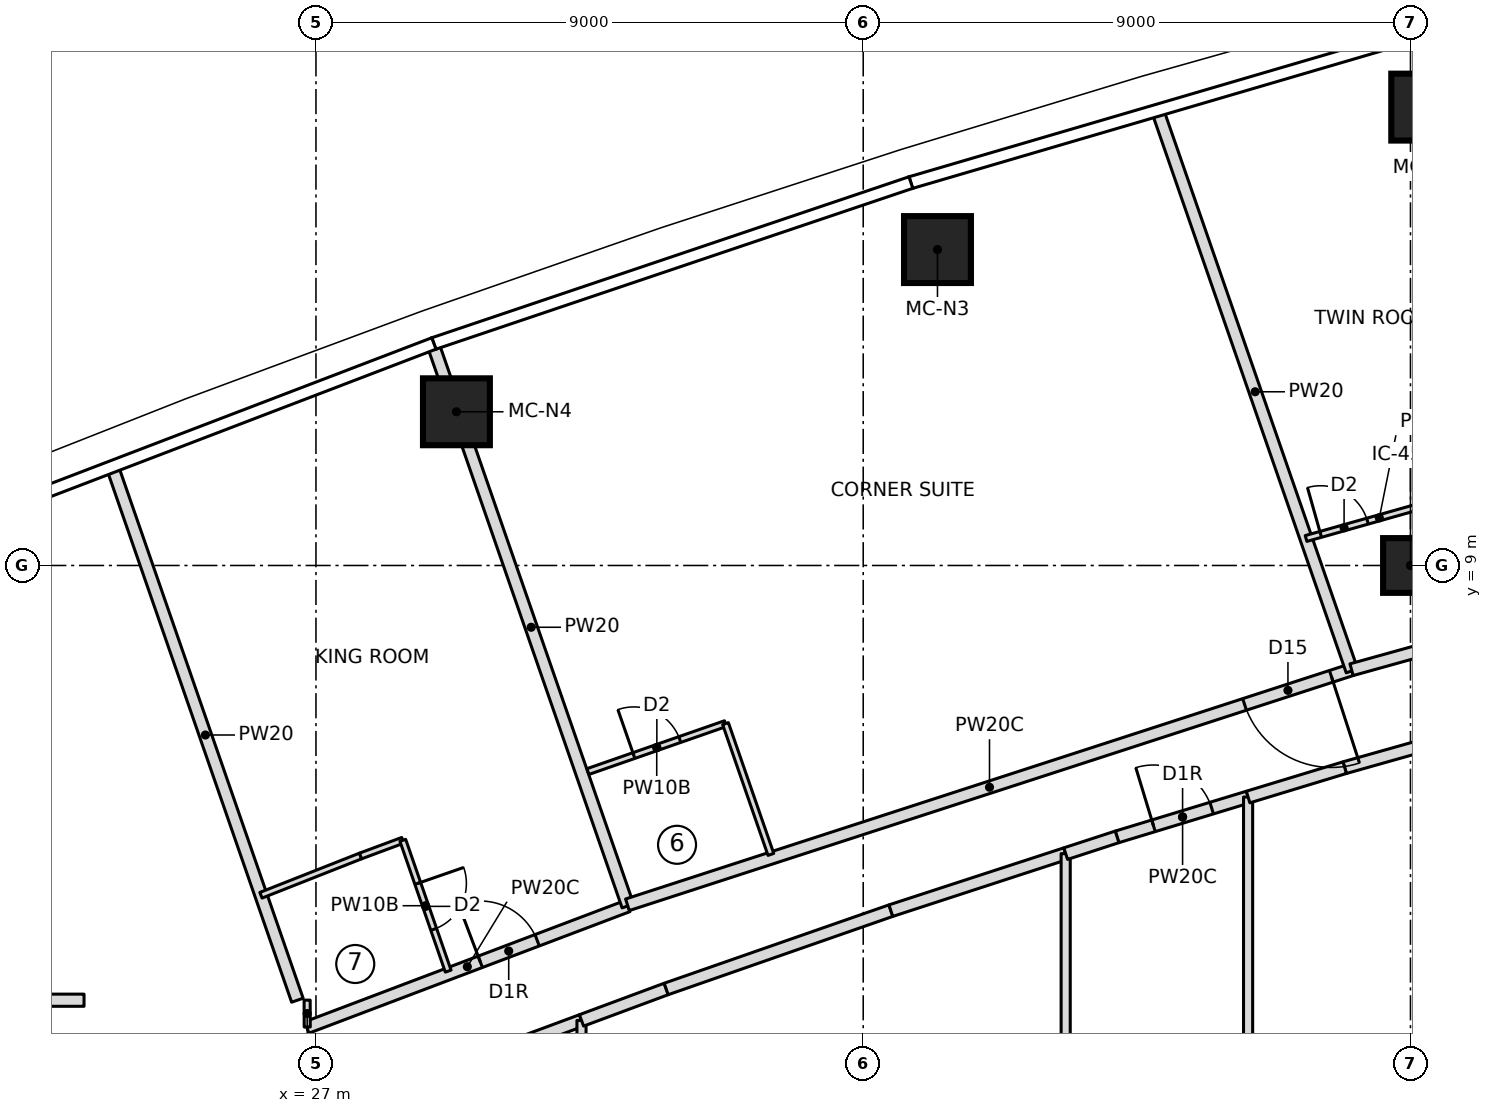
"""IFC4 building model, lengths in metres.
Left out: names, types, materials, properties, quantities, classifications, styles, units other than length and angle.
Written with IfcOpenShell. Run it as: python <this file> out.ifc"""

import sys

from ifc_helpers import new_model, si_unit, direction, frame, frame_2d, origin, origin_2d, place, context, subcontext, project, spatial, rectangle, extrude, element, fill, save


model = new_model("IFC4")
c1 = context("Model", 3, precision=1e-05, world=origin(), true_north=direction((0.0, 1.0)))
c2 = subcontext(c1, "Body", "Model", "MODEL_VIEW")
j1 = project(units=[si_unit("LENGTHUNIT", "METRE"), si_unit("PLANEANGLEUNIT", "RADIAN")], contexts=[c1])
p1 = place(None, origin())
s1 = spatial("IfcSite", under=j1, at=p1, CompositionType="ELEMENT")
p2 = place(p1, origin())
s2 = spatial("IfcBuilding", under=s1, at=p2, CompositionType="ELEMENT")
p3 = place(p2, frame((0.0, 0.0, 271.45)))
s3 = spatial("IfcBuildingStorey", under=s2, at=p3, CompositionType="ELEMENT", Elevation=271.45)
for number, where, z_axis, x_axis in (
    (1, (45.235, 16.539, 0.0), (0.0, 0.0, 1.0), (1.0, 0.0, 0.0)),
    (2, (37.221, 14.196, 0.0), (0.0, 0.0, 1.0), (1.0, 0.0, 0.0)),
    (3, (29.31, 11.528, 0.0), (0.0, 0.0, 1.0), (1.0, 0.0, 0.0)),
):
    element("IfcColumn", number, at=place(p3, frame(where, z_axis=z_axis, x_axis=x_axis)), inside=s3, PredefinedType="COLUMN", context=c2, shape_type="SweptSolid", body=[
        extrude(rectangle(XDim=1.1, YDim=1.1, at=origin_2d()), origin(), (0.0, 0.0, 1.0), 3.55),
    ])
p4 = place(p3, frame((45.0, 9.0, 0.0), z_axis=(0.0, 0.0, 1.0), x_axis=(1.0, 0.0, 0.0)))
e4 = element("IfcColumn", 4, at=p4, inside=s3, PredefinedType="COLUMN", context=c2, shape_type="SweptSolid", body=[
    extrude(rectangle(XDim=0.9, YDim=0.9, at=origin_2d()), origin(), (0.0, 0.0, 1.0), 3.55),
])
p5 = place(p3, frame((7.287, 1.85, 0.0), z_axis=(0.0, 0.0, 1.0), x_axis=(1.0, 0.0, 0.0)))
e5 = element("IfcWall", 5, at=p5, inside=s3, PredefinedType="PARTITIONING", context=c2, shape_type="SweptSolid", body=[
    extrude(rectangle(XDim=15.899, YDim=0.2, at=frame_2d((7.949, 0.0))), origin(), (0.0, 0.0, 1.0), 3.25),
])
p6 = place(p5, frame((7.624, 0.0, 0.0)))
e6 = element("IfcOpeningElement", 6, at=p6, cuts=e5, PredefinedType="OPENING", context=c2, shape_type="SweptSolid", body=[
    extrude(rectangle(XDim=1.0, YDim=2.1, at=frame_2d((0.5, 1.05))), frame((0.0, 0.11, 0.0), z_axis=(0.0, -1.0, 0.0), x_axis=(1.0, 0.0, 0.0)), (0.0, 0.0, 1.0), 0.22),
])
p7 = place(p3, frame((26.694, 1.85, 0.0), z_axis=(0.0, 0.0, 1.0), x_axis=(-0.327714422317, 0.944776829418, 0.0)))
e7 = element("IfcWall", 7, at=p7, inside=s3, PredefinedType="PARTITIONING", context=c2, shape_type="SweptSolid", body=[
    extrude(rectangle(XDim=9.233, YDim=0.2, at=frame_2d((4.617, 0.0))), origin(), (0.0, 0.0, 1.0), 3.25),
])
p8 = place(p3, frame((26.85, 1.401, 0.0), z_axis=(0.0, 0.0, 1.0), x_axis=(0.935181367748, 0.354169181912, 0.0)))
e8 = element("IfcWall", 8, at=p8, inside=s3, PredefinedType="PARTITIONING", context=c2, shape_type="SweptSolid", body=[
    extrude(rectangle(XDim=5.645, YDim=0.2, at=frame_2d((2.823, 0.0))), origin(), (0.0, 0.0, 1.0), 3.25),
])
p9 = place(p8, frame((3.05, 0.0, 0.0)))
e9 = element("IfcOpeningElement", 9, at=p9, cuts=e8, PredefinedType="OPENING", context=c2, shape_type="SweptSolid", body=[
    extrude(rectangle(XDim=1.0, YDim=2.1, at=frame_2d((0.5, 1.05))), frame((0.0, 0.11, 0.0), z_axis=(0.0, -1.0, 0.0), x_axis=(1.0, 0.0, 0.0)), (0.0, 0.0, 1.0), 0.22),
])
p10 = place(p3, frame((26.096, 3.576, 0.0), z_axis=(0.0, 0.0, 1.0), x_axis=(0.930254925629, 0.366913850028, 0.0)))
e10 = element("IfcWall", 10, at=p10, inside=s3, PredefinedType="PARTITIONING", context=c2, shape_type="SweptSolid", body=[
    extrude(rectangle(XDim=1.76, YDim=0.1, at=frame_2d((0.88, 0.0))), origin(), (0.0, 0.0, 1.0), 3.25),
])
p11 = place(p3, frame((27.733, 4.222, 0.0), z_axis=(0.0, 0.0, 1.0), x_axis=(0.937514267289, 0.347946833049, 0.0)))
e11 = element("IfcWall", 11, at=p11, inside=s3, PredefinedType="PARTITIONING", context=c2, shape_type="SweptSolid", body=[
    extrude(rectangle(XDim=0.742, YDim=0.1, at=frame_2d((0.371, 0.0))), origin(), (0.0, 0.0, 1.0), 3.25),
])
p12 = place(p3, frame((28.428, 4.48, 0.0), z_axis=(0.0, 0.0, 1.0), x_axis=(0.327718024288, -0.944775579996, 0.0)))
e12 = element("IfcWall", 12, at=p12, inside=s3, PredefinedType="PARTITIONING", context=c2, shape_type="SweptSolid", body=[
    extrude(rectangle(XDim=2.277, YDim=0.1, at=frame_2d((1.139, 0.0))), origin(), (0.0, 0.0, 1.0), 3.25),
])
p13 = place(p12, frame((0.75, 0.0, 0.0)))
e13 = element("IfcOpeningElement", 13, at=p13, cuts=e12, PredefinedType="OPENING", context=c2, shape_type="SweptSolid", body=[
    extrude(rectangle(XDim=0.8, YDim=2.1, at=frame_2d((0.4, 1.05))), frame((0.0, 0.06, 0.0), z_axis=(0.0, -1.0, 0.0), x_axis=(1.0, 0.0, 0.0)), (0.0, 0.0, 1.0), 0.12),
])
p14 = place(p3, frame((32.129, 3.401, 0.0), z_axis=(0.0, 0.0, 1.0), x_axis=(-0.327724115377, 0.944773467134, 0.0)))
e14 = element("IfcWall", 14, at=p14, inside=s3, PredefinedType="PARTITIONING", context=c2, shape_type="SweptSolid", body=[
    extrude(rectangle(XDim=9.702, YDim=0.2, at=frame_2d((4.851, 0.0))), origin(), (0.0, 0.0, 1.0), 3.25),
])
p15 = place(p3, frame((44.031, 7.286, 0.0), z_axis=(0.0, 0.0, 1.0), x_axis=(-0.951130603276, -0.308788885019, 0.0)))
e15 = element("IfcWall", 15, at=p15, inside=s3, PredefinedType="PARTITIONING", context=c2, shape_type="SweptSolid", body=[
    extrude(rectangle(XDim=12.521, YDim=0.2, at=frame_2d((6.26, 0.0))), origin(), (0.0, 0.0, 1.0), 3.25),
])
p16 = place(p15, frame((0.35, 0.0, 0.0)))
e16 = element("IfcOpeningElement", 16, at=p16, cuts=e15, PredefinedType="OPENING", context=c2, shape_type="SweptSolid", body=[
    extrude(rectangle(XDim=1.5, YDim=2.1, at=frame_2d((0.75, 1.05))), frame((0.0, 0.11, 0.0), z_axis=(0.0, -1.0, 0.0), x_axis=(1.0, 0.0, 0.0)), (0.0, 0.0, 1.0), 0.22),
])
p17 = place(p3, frame((31.473, 5.611, 0.0), z_axis=(0.0, 0.0, 1.0), x_axis=(0.944305532659, 0.329069994059, 0.0)))
e17 = element("IfcWall", 17, at=p17, inside=s3, PredefinedType="PARTITIONING", context=c2, shape_type="SweptSolid", body=[
    extrude(rectangle(XDim=2.396, YDim=0.1, at=frame_2d((1.198, 0.0))), origin(), (0.0, 0.0, 1.0), 3.25),
])
p18 = place(p17, frame((0.8, 0.0, 0.0)))
e18 = element("IfcOpeningElement", 18, at=p18, cuts=e17, PredefinedType="OPENING", context=c2, shape_type="SweptSolid", body=[
    extrude(rectangle(XDim=0.8, YDim=2.1, at=frame_2d((0.4, 1.05))), frame((0.0, 0.06, 0.0), z_axis=(0.0, -1.0, 0.0), x_axis=(1.0, 0.0, 0.0)), (0.0, 0.0, 1.0), 0.12),
])
p19 = place(p3, frame((33.735, 6.399, 0.0), z_axis=(0.0, 0.0, 1.0), x_axis=(0.32768871219, -0.944785747089, 0.0)))
e19 = element("IfcWall", 19, at=p19, inside=s3, PredefinedType="PARTITIONING", context=c2, shape_type="SweptSolid", body=[
    extrude(rectangle(XDim=2.277, YDim=0.1, at=frame_2d((1.138, 0.0))), origin(), (0.0, 0.0, 1.0), 3.25),
])
p20 = place(p3, frame((44.038, 7.267, 0.0), z_axis=(0.0, 0.0, 1.0), x_axis=(-0.327714576096, 0.944776776077, 0.0)))
e20 = element("IfcWall", 20, at=p20, inside=s3, PredefinedType="PARTITIONING", context=c2, shape_type="SweptSolid", body=[
    extrude(rectangle(XDim=9.717, YDim=0.2, at=frame_2d((4.858, 0.0))), origin(), (0.0, 0.0, 1.0), 3.25),
])
p21 = place(p3, frame((48.056, 8.405, 0.0), z_axis=(0.0, 0.0, 1.0), x_axis=(-0.963429942227, -0.267960344866, 0.0)))
e21 = element("IfcWall", 21, at=p21, inside=s3, PredefinedType="PARTITIONING", context=c2, shape_type="SweptSolid", body=[
    extrude(rectangle(XDim=4.177, YDim=0.2, at=frame_2d((2.089, 0.0))), origin(), (0.0, 0.0, 1.0), 3.25),
])
p22 = place(p21, frame((0.35, 0.0, 0.0)))
e22 = element("IfcOpeningElement", 22, at=p22, cuts=e21, PredefinedType="OPENING", context=c2, shape_type="SweptSolid", body=[
    extrude(rectangle(XDim=1.0, YDim=2.1, at=frame_2d((0.5, 1.05))), frame((0.0, 0.11, 0.0), z_axis=(0.0, -1.0, 0.0), x_axis=(1.0, 0.0, 0.0)), (0.0, 0.0, 1.0), 0.22),
])
p23 = place(p3, frame((43.283, 9.444, 0.0), z_axis=(0.0, 0.0, 1.0), x_axis=(0.962409173596, 0.271603723424, 0.0)))
e23 = element("IfcWall", 23, at=p23, inside=s3, PredefinedType="PARTITIONING", context=c2, shape_type="SweptSolid", body=[
    extrude(rectangle(XDim=2.504, YDim=0.1, at=frame_2d((1.252, 0.0))), origin(), (0.0, 0.0, 1.0), 3.25),
])
p24 = place(p23, frame((0.25, 0.0, 0.0)))
e24 = element("IfcOpeningElement", 24, at=p24, cuts=e23, PredefinedType="OPENING", context=c2, shape_type="SweptSolid", body=[
    extrude(rectangle(XDim=0.8, YDim=2.1, at=frame_2d((0.4, 1.05))), frame((0.0, 0.06, 0.0), z_axis=(0.0, -1.0, 0.0), x_axis=(1.0, 0.0, 0.0)), (0.0, 0.0, 1.0), 0.12),
])
p25 = place(p3, frame((29.092, 0.673, 0.0), z_axis=(0.0, 0.0, 1.0), x_axis=(0.937481542944, 0.348034993411, 0.0)))
e25 = element("IfcWall", 25, at=p25, inside=s3, PredefinedType="PARTITIONING", context=c2, shape_type="SweptSolid", body=[
    extrude(rectangle(XDim=2.427, YDim=0.2, at=frame_2d((1.214, 0.0))), origin(), (0.0, 0.0, 1.0), 3.25),
])
p26 = place(p3, frame((31.367, -1.518, 0.0), z_axis=(0.0, 0.0, 1.0), x_axis=(0.0, 1.0, 0.0)))
e26 = element("IfcWall", 26, at=p26, inside=s3, PredefinedType="PARTITIONING", context=c2, shape_type="SweptSolid", body=[
    extrude(rectangle(XDim=3.035, YDim=0.15, at=frame_2d((1.518, 0.0))), origin(), (0.0, 0.0, 1.0), 3.25),
])
p27 = place(p3, frame((31.367, 1.518, 0.0), z_axis=(0.0, 0.0, 1.0), x_axis=(0.93742527201, 0.348186529604, 0.0)))
e27 = element("IfcWall", 27, at=p27, inside=s3, PredefinedType="PARTITIONING", context=c2, shape_type="SweptSolid", body=[
    extrude(rectangle(XDim=1.486, YDim=0.2, at=frame_2d((0.743, 0.0))), origin(), (0.0, 0.0, 1.0), 3.25),
])
p28 = place(p3, frame((32.76, 2.035, 0.0), z_axis=(0.0, 0.0, 1.0), x_axis=(0.944283635062, 0.329132825093, 0.0)))
e28 = element("IfcWall", 28, at=p28, inside=s3, PredefinedType="PARTITIONING", context=c2, shape_type="SweptSolid", body=[
    extrude(rectangle(XDim=3.913, YDim=0.2, at=frame_2d((1.957, 0.0))), origin(), (0.0, 0.0, 1.0), 3.25),
])
p29 = place(p3, frame((36.455, 3.323, 0.0), z_axis=(0.0, 0.0, 1.0), x_axis=(0.95070604111, 0.310093572003, 0.0)))
e29 = element("IfcWall", 29, at=p29, inside=s3, PredefinedType="PARTITIONING", context=c2, shape_type="SweptSolid", body=[
    extrude(rectangle(XDim=3.024, YDim=0.2, at=frame_2d((1.512, 0.0))), origin(), (0.0, 0.0, 1.0), 3.25),
])
p30 = place(p3, frame((39.33, -4.26, 0.0), z_axis=(0.0, 0.0, 1.0), x_axis=(0.0, 1.0, 0.0)))
e30 = element("IfcWall", 30, at=p30, inside=s3, PredefinedType="PARTITIONING", context=c2, shape_type="SweptSolid", body=[
    extrude(rectangle(XDim=8.521, YDim=0.15, at=frame_2d((4.26, 0.0))), origin(), (0.0, 0.0, 1.0), 3.25),
])
p31 = place(p3, frame((40.175, 4.536, 0.0), z_axis=(0.0, 0.0, 1.0), x_axis=(0.956739496331, 0.290945933396, 0.0)))
e31 = element("IfcWall", 31, at=p31, inside=s3, PredefinedType="PARTITIONING", context=c2, shape_type="SweptSolid", body=[
    extrude(rectangle(XDim=2.252, YDim=0.2, at=frame_2d((1.126, 0.0))), origin(), (0.0, 0.0, 1.0), 3.25),
])
p32 = place(p31, frame((0.626, 0.0, 0.0)))
e32 = element("IfcOpeningElement", 32, at=p32, cuts=e31, PredefinedType="OPENING", context=c2, shape_type="SweptSolid", body=[
    extrude(rectangle(XDim=1.0, YDim=2.1, at=frame_2d((0.5, 1.05))), frame((0.0, 0.11, 0.0), z_axis=(0.0, -1.0, 0.0), x_axis=(1.0, 0.0, 0.0)), (0.0, 0.0, 1.0), 0.22),
])
p33 = place(p3, frame((39.33, 4.26, 0.0), z_axis=(0.0, 0.0, 1.0), x_axis=(0.950722800792, 0.310042184314, 0.0)))
e33 = element("IfcWall", 33, at=p33, inside=s3, PredefinedType="PARTITIONING", context=c2, shape_type="SweptSolid", body=[
    extrude(rectangle(XDim=0.889, YDim=0.2, at=frame_2d((0.444, 0.0))), origin(), (0.0, 0.0, 1.0), 3.25),
])
p34 = place(p3, frame((42.33, -5.191, 0.0), z_axis=(0.0, 0.0, 1.0), x_axis=(0.0, 1.0, 0.0)))
e34 = element("IfcWall", 34, at=p34, inside=s3, PredefinedType="PARTITIONING", context=c2, shape_type="SweptSolid", body=[
    extrude(rectangle(XDim=10.383, YDim=0.15, at=frame_2d((5.191, 0.0))), origin(), (0.0, 0.0, 1.0), 3.25),
])
p35 = place(p3, frame((43.918, 5.675, 0.0), z_axis=(0.0, 0.0, 1.0), x_axis=(0.962411212211, 0.271596499628, 0.0)))
e35 = element("IfcWall", 35, at=p35, inside=s3, PredefinedType="PARTITIONING", context=c2, shape_type="SweptSolid", body=[
    extrude(rectangle(XDim=3.913, YDim=0.2, at=frame_2d((1.957, 0.0))), origin(), (0.0, 0.0, 1.0), 3.25),
])
p36 = place(p35, frame((1.457, 0.0, 0.0)))
e36 = element("IfcOpeningElement", 36, at=p36, cuts=e35, PredefinedType="OPENING", context=c2, shape_type="SweptSolid", body=[
    extrude(rectangle(XDim=1.0, YDim=2.1, at=frame_2d((0.5, 1.05))), frame((0.0, 0.11, 0.0), z_axis=(0.0, -1.0, 0.0), x_axis=(1.0, 0.0, 0.0)), (0.0, 0.0, 1.0), 0.22),
])
p37 = place(p3, frame((42.33, 5.191, 0.0), z_axis=(0.0, 0.0, 1.0), x_axis=(0.956702361065, 0.291068020115, 0.0)))
e37 = element("IfcWall", 37, at=p37, inside=s3, PredefinedType="PARTITIONING", context=c2, shape_type="SweptSolid", body=[
    extrude(rectangle(XDim=1.661, YDim=0.2, at=frame_2d((0.831, 0.0))), origin(), (0.0, 0.0, 1.0), 3.25),
])
p38 = place(p3, frame((26.856, 1.409, 0.0), z_axis=(0.0, 0.0, 1.0), x_axis=(-0.003863105832, 0.999992538179, 0.0)))
e38 = element("IfcWall", 38, at=p38, inside=s3, PredefinedType="PARTITIONING", context=c2, shape_type="SweptSolid", body=[
    extrude(rectangle(XDim=0.442, YDim=0.1, at=frame_2d((0.221, 0.0))), origin(), (0.0, 0.0, 1.0), 3.25),
])
p39 = place(p13, origin())
e39 = element("IfcDoor", 39, at=p39, inside=s3, OperationType="SINGLE_SWING_LEFT", PredefinedType="DOOR", context=c2, shape_type="SweptSolid", body=[
    extrude(rectangle(XDim=0.8, YDim=2.1, at=frame_2d((0.4, 1.05))), frame((0.0, 0.025, 0.0), z_axis=(0.0, -1.0, 0.0), x_axis=(1.0, 0.0, 0.0)), (0.0, 0.0, 1.0), 0.05),
])
fill(e13, e39)
p40 = place(p9, origin())
e40 = element("IfcDoor", 40, at=p40, inside=s3, OperationType="SINGLE_SWING_RIGHT", PredefinedType="DOOR", context=c2, shape_type="SweptSolid", body=[
    extrude(rectangle(XDim=1.0, YDim=2.1, at=frame_2d((0.5, 1.05))), frame((0.0, 0.025, 0.0), z_axis=(0.0, -1.0, 0.0), x_axis=(1.0, 0.0, 0.0)), (0.0, 0.0, 1.0), 0.05),
])
fill(e9, e40)
p41 = place(p18, origin())
e41 = element("IfcDoor", 41, at=p41, inside=s3, OperationType="SINGLE_SWING_LEFT", PredefinedType="DOOR", context=c2, shape_type="SweptSolid", body=[
    extrude(rectangle(XDim=0.8, YDim=2.1, at=frame_2d((0.4, 1.05))), frame((0.0, 0.025, 0.0), z_axis=(0.0, -1.0, 0.0), x_axis=(1.0, 0.0, 0.0)), (0.0, 0.0, 1.0), 0.05),
])
fill(e18, e41)
p42 = place(p16, origin())
e42 = element("IfcDoor", 42, at=p42, inside=s3, OperationType="DOUBLE_DOOR_SINGLE_SWING", PredefinedType="DOOR", context=c2, shape_type="SweptSolid", body=[
    extrude(rectangle(XDim=1.5, YDim=2.1, at=frame_2d((0.75, 1.05))), frame((0.0, 0.025, 0.0), z_axis=(0.0, -1.0, 0.0), x_axis=(1.0, 0.0, 0.0)), (0.0, 0.0, 1.0), 0.05),
])
fill(e16, e42)
p43 = place(p24, origin())
e43 = element("IfcDoor", 43, at=p43, inside=s3, OperationType="SINGLE_SWING_LEFT", PredefinedType="DOOR", context=c2, shape_type="SweptSolid", body=[
    extrude(rectangle(XDim=0.8, YDim=2.1, at=frame_2d((0.4, 1.05))), frame((0.0, 0.025, 0.0), z_axis=(0.0, -1.0, 0.0), x_axis=(1.0, 0.0, 0.0)), (0.0, 0.0, 1.0), 0.05),
])
fill(e24, e43)
p44 = place(p32, origin())
e44 = element("IfcDoor", 44, at=p44, inside=s3, OperationType="SINGLE_SWING_RIGHT", PredefinedType="DOOR", context=c2, shape_type="SweptSolid", body=[
    extrude(rectangle(XDim=1.0, YDim=2.1, at=frame_2d((0.5, 1.05))), frame((0.0, 0.025, 0.0), z_axis=(0.0, -1.0, 0.0), x_axis=(1.0, 0.0, 0.0)), (0.0, 0.0, 1.0), 0.05),
])
fill(e32, e44)
save(model, sys.argv[1])
